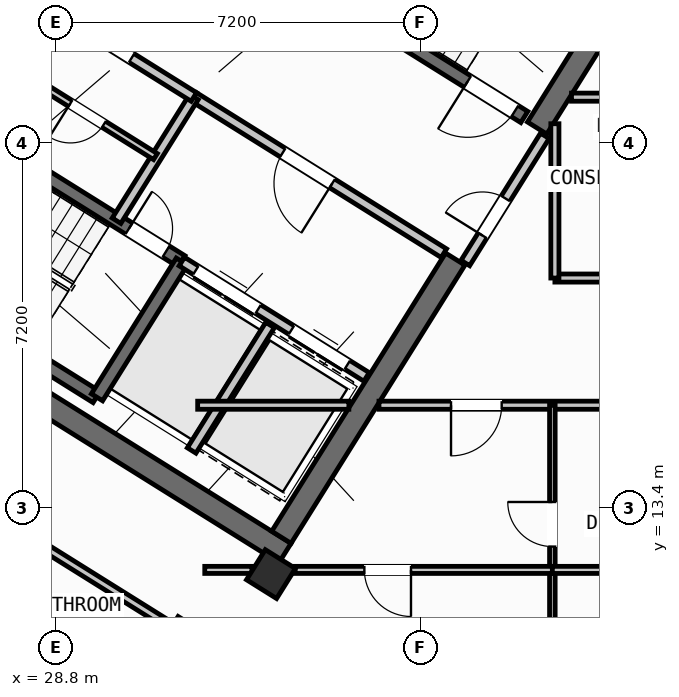
"""IFC4 building model, lengths in metres.
Left out: names, types, materials, properties, quantities, classifications, styles, units other than length and angle.
Written with IfcOpenShell. Run it as: python <this file> out.ifc"""

import sys

from ifc_helpers import new_model, si_unit, direction, frame, frame_2d, origin, origin_2d, place, context, subcontext, project, spatial, rectangle, hollow_rectangle, extrude, source, transform, mapped, element, fill, save


model = new_model("IFC4")
c1 = context("Model", 3, precision=1e-05, world=origin(), true_north=direction((0.0, 1.0)))
c2 = subcontext(c1, "Body", "Model", "MODEL_VIEW")
j1 = project(units=[si_unit("LENGTHUNIT", "METRE"), si_unit("PLANEANGLEUNIT", "RADIAN")], contexts=[c1])
p1 = place(None, origin())
s1 = spatial("IfcSite", under=j1, at=p1, CompositionType="ELEMENT")
p2 = place(p1, origin())
s2 = spatial("IfcBuilding", under=s1, at=p2, CompositionType="ELEMENT")
p3 = place(p2, frame((0.0, 0.0, 273.6)))
s3 = spatial("IfcBuildingStorey", under=s2, at=p3, CompositionType="ELEMENT", Elevation=273.6)
p4 = place(p3, frame((33.324, 12.503, 0.0), z_axis=(0.0, 0.0, 1.0), x_axis=(-0.848043529849, 0.529926571782, 0.0)))
e1 = element("IfcWall", 1, at=p4, inside=s3, PredefinedType="SHEAR", context=c2, shape_type="SweptSolid", body=[
    extrude(rectangle(XDim=13.04, YDim=0.45, at=frame_2d((6.52, 0.0))), origin(), (0.0, 0.0, 1.0), 3.35),
])
p5 = place(p3, frame((40.221, 23.965, 0.0), z_axis=(0.0, 0.0, 1.0), x_axis=(-0.529902075036, -0.848058836916, 0.0)))
e2 = element("IfcWall", 2, at=p5, inside=s3, PredefinedType="SHEAR", context=c2, shape_type="SweptSolid", body=[
    extrude(rectangle(XDim=3.625, YDim=0.45, at=frame_2d((1.812, 0.0))), origin(), (0.0, 0.0, 1.0), 3.35),
])
p6 = place(p3, frame((36.683, 18.304, 0.0), z_axis=(0.0, 0.0, 1.0), x_axis=(-0.529904039071, -0.848057609704, 0.0)))
e3 = element("IfcWall", 3, at=p6, inside=s3, PredefinedType="SHEAR", context=c2, shape_type="SweptSolid", body=[
    extrude(rectangle(XDim=6.475, YDim=0.45, at=frame_2d((3.238, 0.0))), origin(), (0.0, 0.0, 1.0), 3.35),
])
m1 = source(origin(), c2, "Body", "SweptSolid", [
    extrude(hollow_rectangle(XDim=0.7, YDim=0.7, WallThickness=0.028, at=origin_2d()), origin(), (0.0, 0.0, 1.0), 3.6),
])
p7 = place(p3, frame((33.046, 12.087, 0.0), z_axis=(0.0, 0.0, 1.0), x_axis=(-0.848048096156, 0.529919264233, 0.0)))
e4 = element("IfcColumn", 4, at=p7, inside=s3, PredefinedType="COLUMN", context=c2, shape_type="MappedRepresentation", body=[
    mapped(m1, transform((0.0, 0.0, 0.0), scale=1.0)),
])
p8 = place(p3, frame((29.268, 6.429, 0.0), z_axis=(0.0, 0.0, 1.0), x_axis=(-0.848049971435, 0.529916263149, 0.0)))
e5 = element("IfcWall", 5, at=p8, inside=s3, PredefinedType="STANDARD", context=c2, shape_type="SweptSolid", body=[
    extrude(rectangle(XDim=31.588, YDim=0.32, at=frame_2d((15.794, 0.0))), origin(), (0.0, 0.0, 1.0), 3.35),
])
p9 = place(p8, frame((16.362, 0.0, 0.0)))
e6 = element("IfcOpeningElement", 6, at=p9, cuts=e5, PredefinedType="OPENING", context=c2, shape_type="SweptSolid", body=[
    extrude(rectangle(XDim=1.2, YDim=2.15, at=frame_2d((0.6, 1.075))), frame((0.0, 0.17, 0.0), z_axis=(0.0, -1.0, 0.0), x_axis=(1.0, 0.0, 0.0)), (0.0, 0.0, 1.0), 0.34),
])
p10 = place(p8, frame((3.859, 0.0, 0.9)))
e7 = element("IfcOpeningElement", 7, at=p10, cuts=e5, PredefinedType="OPENING", context=c2, shape_type="SweptSolid", body=[
    extrude(rectangle(XDim=1.65, YDim=1.45, at=frame_2d((0.825, 0.725))), frame((0.0, 0.17, 0.0), z_axis=(0.0, -1.0, 0.0), x_axis=(1.0, 0.0, 0.0)), (0.0, 0.0, 1.0), 0.34),
])
p11 = place(p8, frame((10.519, 0.0, 0.9)))
e8 = element("IfcOpeningElement", 8, at=p11, cuts=e5, PredefinedType="OPENING", context=c2, shape_type="SweptSolid", body=[
    extrude(rectangle(XDim=1.65, YDim=1.45, at=frame_2d((0.825, 0.725))), frame((0.0, 0.17, 0.0), z_axis=(0.0, -1.0, 0.0), x_axis=(1.0, 0.0, 0.0)), (0.0, 0.0, 1.0), 0.34),
])
p12 = place(p8, frame((21.219, 0.0, 0.95)))
e9 = element("IfcOpeningElement", 9, at=p12, cuts=e5, PredefinedType="OPENING", context=c2, shape_type="SweptSolid", body=[
    extrude(rectangle(XDim=1.95, YDim=1.35, at=frame_2d((0.975, 0.675))), frame((0.0, 0.17, 0.0), z_axis=(0.0, -1.0, 0.0), x_axis=(1.0, 0.0, 0.0)), (0.0, 0.0, 1.0), 0.34),
])
p13 = place(p8, frame((26.406, 0.0, 1.0)))
e10 = element("IfcOpeningElement", 10, at=p13, cuts=e5, PredefinedType="OPENING", context=c2, shape_type="SweptSolid", body=[
    extrude(rectangle(XDim=0.9, YDim=1.25, at=frame_2d((0.45, 0.625))), frame((0.0, 0.17, 0.0), z_axis=(0.0, -1.0, 0.0), x_axis=(1.0, 0.0, 0.0)), (0.0, 0.0, 1.0), 0.34),
])
p14 = place(p8, frame((29.143, 0.0, 0.9)))
e11 = element("IfcOpeningElement", 11, at=p14, cuts=e5, PredefinedType="OPENING", context=c2, shape_type="SweptSolid", body=[
    extrude(rectangle(XDim=1.65, YDim=1.45, at=frame_2d((0.825, 0.725))), frame((0.0, 0.17, 0.0), z_axis=(0.0, -1.0, 0.0), x_axis=(1.0, 0.0, 0.0)), (0.0, 0.0, 1.0), 0.34),
])
p15 = place(p3, frame((29.605, 15.581, 0.0), z_axis=(0.0, 0.0, 1.0), x_axis=(-0.848036911448, 0.529937163087, 0.0)))
e12 = element("IfcWall", 12, at=p15, inside=s3, PredefinedType="SHEAR", context=c2, shape_type="SweptSolid", body=[
    extrude(rectangle(XDim=7.46, YDim=0.26, at=frame_2d((3.73, 0.0))), origin(), (0.0, 0.0, 1.0), 3.35),
])
p16 = place(p3, frame((31.28, 18.261, 0.0), z_axis=(0.0, 0.0, 1.0), x_axis=(-0.848051618787, 0.529913626805, 0.0)))
e13 = element("IfcWall", 13, at=p16, inside=s3, PredefinedType="SHEAR", context=c2, shape_type="SweptSolid", body=[
    extrude(rectangle(XDim=7.46, YDim=0.26, at=frame_2d((3.73, 0.0))), origin(), (0.0, 0.0, 1.0), 3.35),
])
p17 = place(p16, frame((0.36, 0.0, 0.0)))
e14 = element("IfcOpeningElement", 14, at=p17, cuts=e13, PredefinedType="OPENING", context=c2, shape_type="SweptSolid", body=[
    extrude(rectangle(XDim=0.86, YDim=2.05, at=frame_2d((0.43, 1.025))), frame((0.0, 0.14, 0.0), z_axis=(0.0, -1.0, 0.0), x_axis=(1.0, 0.0, 0.0)), (0.0, 0.0, 1.0), 0.28),
])
p18 = place(p3, frame((31.288, 18.256, 0.0), z_axis=(0.0, 0.0, 1.0), x_axis=(-0.529943379326, -0.848033026897, 0.0)))
e15 = element("IfcWall", 15, at=p18, inside=s3, PredefinedType="SHEAR", context=c2, shape_type="SweptSolid", body=[
    extrude(rectangle(XDim=3.16, YDim=0.26, at=frame_2d((1.58, 0.0))), origin(), (0.0, 0.0, 1.0), 3.35),
])
p19 = place(p3, frame((38.046, 21.108, 0.0), z_axis=(0.0, 0.0, 1.0), x_axis=(-0.848054434086, 0.529909121291, 0.0)))
e16 = element("IfcWall", 16, at=p19, inside=s3, PredefinedType="SHEAR", context=c2, shape_type="SweptSolid", body=[
    extrude(rectangle(XDim=7.33, YDim=0.26, at=frame_2d((3.665, 0.0))), origin(), (0.0, 0.0, 1.0), 3.35),
])
p20 = place(p19, frame((0.22, 0.0, 0.0)))
e17 = element("IfcOpeningElement", 17, at=p20, cuts=e16, PredefinedType="OPENING", context=c2, shape_type="SweptSolid", body=[
    extrude(rectangle(XDim=1.1, YDim=2.1, at=frame_2d((0.55, 1.05))), frame((0.0, 0.14, 0.0), z_axis=(0.0, -1.0, 0.0), x_axis=(1.0, 0.0, 0.0)), (0.0, 0.0, 1.0), 0.28),
])
p21 = place(p3, frame((34.933, 15.978, 0.0), z_axis=(0.0, 0.0, 1.0), x_axis=(-0.848055739377, 0.529907032327, 0.0)))
e18 = element("IfcWall", 18, at=p21, inside=s3, PredefinedType="STANDARD", context=c2, shape_type="SweptSolid", body=[
    extrude(rectangle(XDim=4.298, YDim=0.2, at=frame_2d((2.149, 0.0))), origin(), (0.0, 0.0, 1.0), 3.34),
])
p22 = place(p21, frame((0.448, 0.0, 0.0)))
e19 = element("IfcOpeningElement", 19, at=p22, cuts=e18, PredefinedType="OPENING", context=c2, shape_type="SweptSolid", body=[
    extrude(rectangle(XDim=1.3, YDim=2.2, at=frame_2d((0.65, 1.1))), frame((0.0, 0.11, 0.0), z_axis=(0.0, -1.0, 0.0), x_axis=(1.0, 0.0, 0.0)), (0.0, 0.0, 1.0), 0.22),
])
p23 = place(p21, frame((2.523, 0.0, 0.0)))
e20 = element("IfcOpeningElement", 20, at=p23, cuts=e18, PredefinedType="OPENING", context=c2, shape_type="SweptSolid", body=[
    extrude(rectangle(XDim=1.45, YDim=2.25, at=frame_2d((0.725, 1.125))), frame((0.0, 0.11, 0.0), z_axis=(0.0, -1.0, 0.0), x_axis=(1.0, 0.0, 0.0)), (0.0, 0.0, 1.0), 0.22),
])
p24 = place(p3, frame((36.459, 18.421, 0.0), z_axis=(0.0, 0.0, 1.0), x_axis=(-0.848059591691, 0.529900867089, 0.0)))
e21 = element("IfcWall", 21, at=p24, inside=s3, PredefinedType="STANDARD", context=c2, shape_type="SweptSolid", body=[
    extrude(rectangle(XDim=5.818, YDim=0.2, at=frame_2d((2.909, 0.0))), origin(), (0.0, 0.0, 1.0), 3.34),
])
p25 = place(p24, frame((2.598, 0.0, 0.0)))
e22 = element("IfcOpeningElement", 22, at=p25, cuts=e21, PredefinedType="OPENING", context=c2, shape_type="SweptSolid", body=[
    extrude(rectangle(XDim=1.15, YDim=2.1, at=frame_2d((0.575, 1.05))), frame((0.0, 0.11, 0.0), z_axis=(0.0, -1.0, 0.0), x_axis=(1.0, 0.0, 0.0)), (0.0, 0.0, 1.0), 0.22),
])
p26 = place(p3, frame((33.029, 17.003, 0.0), z_axis=(0.0, 0.0, 1.0), x_axis=(-0.529916267533, -0.848049968695, 0.0)))
e23 = element("IfcWall", 23, at=p26, inside=s3, PredefinedType="STANDARD", context=c2, shape_type="SweptSolid", body=[
    extrude(rectangle(XDim=2.92, YDim=0.2, at=frame_2d((1.46, 0.0))), origin(), (0.0, 0.0, 1.0), 3.34),
])
for number, where, z_axis, x_axis in (
    (24, (31.525, 21.504, 0.0), (0.0, 0.0, 1.0), (-0.53, -0.848, 0.0)),
    (25, (28.71, 23.263, 0.0), (0.0, 0.0, 1.0), (-0.53, -0.848, 0.0)),
):
    element("IfcWall", number, at=place(p3, frame(where, z_axis=z_axis, x_axis=x_axis)), inside=s3, PredefinedType="STANDARD", context=c2, shape_type="SweptSolid", body=[
        extrude(rectangle(XDim=2.88, YDim=0.2, at=frame_2d((1.44, 0.0))), origin(), (0.0, 0.0, 1.0), 3.34),
    ])
p27 = place(p3, frame((31.525, 21.504, 0.0), z_axis=(0.0, 0.0, 1.0), x_axis=(-0.848042066329, 0.529928913853, 0.0)))
e26 = element("IfcWall", 26, at=p27, inside=s3, PredefinedType="STANDARD", context=c2, shape_type="SweptSolid", body=[
    extrude(rectangle(XDim=6.268, YDim=0.2, at=frame_2d((3.134, 0.0))), origin(), (0.0, 0.0, 1.0), 3.34),
])
p28 = place(p27, frame((4.4, 0.0, 0.0)))
e27 = element("IfcOpeningElement", 27, at=p28, cuts=e26, PredefinedType="OPENING", context=c2, shape_type="SweptSolid", body=[
    extrude(rectangle(XDim=0.86, YDim=2.05, at=frame_2d((0.43, 1.025))), frame((0.0, 0.11, 0.0), z_axis=(0.0, -1.0, 0.0), x_axis=(1.0, 0.0, 0.0)), (0.0, 0.0, 1.0), 0.22),
])
p29 = place(p27, frame((1.45, 0.0, 0.0)))
e28 = element("IfcOpeningElement", 28, at=p29, cuts=e26, PredefinedType="OPENING", context=c2, shape_type="SweptSolid", body=[
    extrude(rectangle(XDim=0.86, YDim=2.05, at=frame_2d((0.43, 1.025))), frame((0.0, 0.11, 0.0), z_axis=(0.0, -1.0, 0.0), x_axis=(1.0, 0.0, 0.0)), (0.0, 0.0, 1.0), 0.22),
])
p30 = place(p3, frame((30.766, 20.327, 0.0), z_axis=(0.0, 0.0, 1.0), x_axis=(-0.848052663127, 0.529911955482, 0.0)))
e29 = element("IfcWall", 29, at=p30, inside=s3, PredefinedType="PLUMBINGWALL", context=c2, shape_type="SweptSolid", body=[
    extrude(rectangle(XDim=3.28, YDim=0.14, at=frame_2d((1.64, 0.0))), origin(), (0.0, 0.0, 1.0), 3.34),
])
p31 = place(p30, frame((1.2, 0.0, 0.0)))
e30 = element("IfcOpeningElement", 30, at=p31, cuts=e29, PredefinedType="OPENING", context=c2, shape_type="SweptSolid", body=[
    extrude(rectangle(XDim=0.78, YDim=2.05, at=frame_2d((0.39, 1.025))), frame((0.0, 0.08, 0.0), z_axis=(0.0, -1.0, 0.0), x_axis=(1.0, 0.0, 0.0)), (0.0, 0.0, 1.0), 0.16),
])
p32 = place(p3, frame((32.164, 10.374, 0.0), z_axis=(0.0, 0.0, 1.0), x_axis=(-0.848044107957, 0.529925646633, 0.0)))
e31 = element("IfcWall", 31, at=p32, inside=s3, PredefinedType="PARTITIONING", context=c2, shape_type="SweptSolid", body=[
    extrude(rectangle(XDim=15.57, YDim=0.16, at=frame_2d((7.785, 0.0))), origin(), (0.0, 0.0, 1.0), 3.34),
])
p33 = place(p32, frame((10.83, 0.0, 0.0)))
e32 = element("IfcOpeningElement", 32, at=p33, cuts=e31, PredefinedType="OPENING", context=c2, shape_type="SweptSolid", body=[
    extrude(rectangle(XDim=1.0, YDim=2.1, at=frame_2d((0.5, 1.05))), frame((0.0, 0.09, 0.0), z_axis=(0.0, -1.0, 0.0), x_axis=(1.0, 0.0, 0.0)), (0.0, 0.0, 1.0), 0.18),
])
p34 = place(p3, frame((31.282, 11.208, 0.0), z_axis=(0.0, 0.0, 1.0), x_axis=(-0.529938869374, -0.84803584519, 0.0)))
e33 = element("IfcWall", 33, at=p34, inside=s3, PredefinedType="PARTITIONING", context=c2, shape_type="SweptSolid", body=[
    extrude(rectangle(XDim=5.48, YDim=0.16, at=frame_2d((2.74, 0.0))), origin(), (0.0, 0.0, 1.0), 3.34),
])
p35 = place(p3, frame((29.72, 8.859, 0.0), z_axis=(0.0, 0.0, 1.0), x_axis=(-0.848049134363, 0.529917602752, 0.0)))
e34 = element("IfcWall", 34, at=p35, inside=s3, PredefinedType="PLUMBINGWALL", context=c2, shape_type="SweptSolid", body=[
    extrude(rectangle(XDim=14.3, YDim=0.14, at=frame_2d((7.15, 0.0))), origin(), (0.0, 0.0, 1.0), 3.34),
])
p36 = place(p35, frame((9.57, 0.0, 0.0)))
e35 = element("IfcOpeningElement", 35, at=p36, cuts=e34, PredefinedType="OPENING", context=c2, shape_type="SweptSolid", body=[
    extrude(rectangle(XDim=0.92, YDim=2.08, at=frame_2d((0.46, 1.04))), frame((0.0, 0.08, 0.0), z_axis=(0.0, -1.0, 0.0), x_axis=(1.0, 0.0, 0.0)), (0.0, 0.0, 1.0), 0.16),
])
p37 = place(p3, frame((38.451, 20.737, 0.0), z_axis=(0.0, 0.0, 1.0), x_axis=(-0.529924799939, -0.848044637038, 0.0)))
e36 = element("IfcWall", 36, at=p37, inside=s3, PredefinedType="STANDARD", context=c2, shape_type="SweptSolid", body=[
    extrude(rectangle(XDim=2.96, YDim=0.2, at=frame_2d((1.48, 0.0))), origin(), (0.0, 0.0, 1.0), 3.34),
])
p38 = place(p37, frame((1.46, 0.0, 0.0)))
e37 = element("IfcOpeningElement", 37, at=p38, cuts=e36, PredefinedType="OPENING", context=c2, shape_type="SweptSolid", body=[
    extrude(rectangle(XDim=0.86, YDim=2.05, at=frame_2d((0.43, 1.025))), frame((0.0, 0.11, 0.0), z_axis=(0.0, -1.0, 0.0), x_axis=(1.0, 0.0, 0.0)), (0.0, 0.0, 1.0), 0.22),
])
p39 = place(p3, frame((31.6, 15.42, 0.0), z_axis=(0.0, 0.0, 1.0), x_axis=(1.0, 0.0, 0.0)))
e38 = element("IfcWall", 38, at=p39, inside=s3, PredefinedType="PARTITIONING", context=c2, shape_type="SweptSolid", body=[
    extrude(rectangle(XDim=2.984, YDim=0.16, at=frame_2d((1.492, 0.0))), origin(), (0.0, 0.0, 1.0), 3.34),
])
p40 = place(p3, frame((35.178, 15.42, 0.0), z_axis=(0.0, 0.0, 1.0), x_axis=(1.0, 0.0, 0.0)))
e39 = element("IfcWall", 39, at=p40, inside=s3, PredefinedType="PARTITIONING", context=c2, shape_type="SweptSolid", body=[
    extrude(rectangle(XDim=9.021, YDim=0.16, at=frame_2d((4.511, 0.0))), origin(), (0.0, 0.0, 1.0), 3.34),
])
p41 = place(p40, frame((1.422, 0.0, 0.0)))
e40 = element("IfcOpeningElement", 40, at=p41, cuts=e39, PredefinedType="OPENING", context=c2, shape_type="SweptSolid", body=[
    extrude(rectangle(XDim=1.0, YDim=2.1, at=frame_2d((0.5, 1.05))), frame((0.0, 0.09, 0.0), z_axis=(0.0, -1.0, 0.0), x_axis=(1.0, 0.0, 0.0)), (0.0, 0.0, 1.0), 0.18),
])
p42 = place(p3, frame((38.65, 17.93, 0.0), z_axis=(0.0, 0.0, 1.0), x_axis=(1.0, 0.0, 0.0)))
e41 = element("IfcWall", 41, at=p42, inside=s3, PredefinedType="PARTITIONING", context=c2, shape_type="SweptSolid", body=[
    extrude(rectangle(XDim=4.15, YDim=0.16, at=frame_2d((2.075, 0.0))), origin(), (0.0, 0.0, 1.0), 3.34),
])
p43 = place(p42, frame((1.575, 0.0, 0.0)))
e42 = element("IfcOpeningElement", 42, at=p43, cuts=e41, PredefinedType="OPENING", context=c2, shape_type="SweptSolid", body=[
    extrude(rectangle(XDim=1.0, YDim=2.1, at=frame_2d((0.5, 1.05))), frame((0.0, 0.09, 0.0), z_axis=(0.0, -1.0, 0.0), x_axis=(1.0, 0.0, 0.0)), (0.0, 0.0, 1.0), 0.18),
])
p44 = place(p3, frame((38.65, 17.93, 0.0), z_axis=(0.0, 0.0, 1.0), x_axis=(0.0, 1.0, 0.0)))
e43 = element("IfcWall", 43, at=p44, inside=s3, PredefinedType="PARTITIONING", context=c2, shape_type="SweptSolid", body=[
    extrude(rectangle(XDim=3.046, YDim=0.16, at=frame_2d((1.523, 0.0))), origin(), (0.0, 0.0, 1.0), 3.34),
])
p45 = place(p3, frame((38.978, 21.5, 0.0), z_axis=(0.0, 0.0, 1.0), x_axis=(1.0, 0.0, 0.0)))
e44 = element("IfcWall", 44, at=p45, inside=s3, PredefinedType="PARTITIONING", context=c2, shape_type="SweptSolid", body=[
    extrude(rectangle(XDim=3.823, YDim=0.16, at=frame_2d((1.911, 0.0))), origin(), (0.0, 0.0, 1.0), 3.34),
])
p46 = place(p3, frame((38.6, 1.96, 0.0), z_axis=(0.0, 0.0, 1.0), x_axis=(0.0, 1.0, 0.0)))
e45 = element("IfcWall", 45, at=p46, inside=s3, PredefinedType="PARTITIONING", context=c2, shape_type="SweptSolid", body=[
    extrude(rectangle(XDim=13.46, YDim=0.11, at=frame_2d((6.73, 0.0))), origin(), (0.0, 0.0, 1.0), 3.34),
])
p47 = place(p46, frame((5.2, 0.0, 0.0)))
e46 = element("IfcOpeningElement", 46, at=p47, cuts=e45, PredefinedType="OPENING", context=c2, shape_type="SweptSolid", body=[
    extrude(rectangle(XDim=0.92, YDim=2.08, at=frame_2d((0.46, 1.04))), frame((0.0, 0.065, 0.0), z_axis=(0.0, -1.0, 0.0), x_axis=(1.0, 0.0, 0.0)), (0.0, 0.0, 1.0), 0.13),
])
p48 = place(p46, frame((10.67, 0.0, 0.0)))
e47 = element("IfcOpeningElement", 47, at=p48, cuts=e45, PredefinedType="OPENING", context=c2, shape_type="SweptSolid", body=[
    extrude(rectangle(XDim=0.88, YDim=2.08, at=frame_2d((0.44, 1.04))), frame((0.0, 0.065, 0.0), z_axis=(0.0, -1.0, 0.0), x_axis=(1.0, 0.0, 0.0)), (0.0, 0.0, 1.0), 0.13),
])
p49 = place(p3, frame((31.74, 12.17, 0.0), z_axis=(0.0, 0.0, 1.0), x_axis=(1.0, 0.0, 0.0)))
e48 = element("IfcWall", 48, at=p49, inside=s3, PredefinedType="PLUMBINGWALL", context=c2, shape_type="SweptSolid", body=[
    extrude(rectangle(XDim=0.931, YDim=0.14, at=frame_2d((0.466, 0.0))), origin(), (0.0, 0.0, 1.0), 3.34),
])
p50 = place(p3, frame((33.525, 12.17, 0.0), z_axis=(0.0, 0.0, 1.0), x_axis=(1.0, 0.0, 0.0)))
e49 = element("IfcWall", 49, at=p50, inside=s3, PredefinedType="PLUMBINGWALL", context=c2, shape_type="SweptSolid", body=[
    extrude(rectangle(XDim=5.075, YDim=0.14, at=frame_2d((2.538, 0.0))), origin(), (0.0, 0.0, 1.0), 3.34),
])
p51 = place(p50, frame((1.365, 0.0, 0.0)))
e50 = element("IfcOpeningElement", 50, at=p51, cuts=e49, PredefinedType="OPENING", context=c2, shape_type="SweptSolid", body=[
    extrude(rectangle(XDim=0.92, YDim=2.08, at=frame_2d((0.46, 1.04))), frame((0.0, 0.08, 0.0), z_axis=(0.0, -1.0, 0.0), x_axis=(1.0, 0.0, 0.0)), (0.0, 0.0, 1.0), 0.16),
])
p52 = place(p3, frame((38.6, 12.17, 0.0), z_axis=(0.0, 0.0, 1.0), x_axis=(1.0, 0.0, 0.0)))
e51 = element("IfcWall", 51, at=p52, inside=s3, PredefinedType="PLUMBINGWALL", context=c2, shape_type="SweptSolid", body=[
    extrude(rectangle(XDim=5.46, YDim=0.14, at=frame_2d((2.73, 0.0))), origin(), (0.0, 0.0, 1.0), 3.34),
])
m2 = source(origin(), c2, "Body", "SweptSolid", [
    extrude(rectangle(XDim=0.86, YDim=2.05, at=frame_2d((0.43, 1.025))), frame((0.0, 0.025, 0.0), z_axis=(0.0, -1.0, 0.0), x_axis=(1.0, 0.0, 0.0)), (0.0, 0.0, 1.0), 0.05),
])
p53 = place(p17, frame((0.86, 0.0, 0.0), z_axis=(0.0, 0.0, 1.0), x_axis=(-1.0, 0.0, 0.0)))
e52 = element("IfcDoor", 52, at=p53, inside=s3, OperationType="SINGLE_SWING_LEFT", PredefinedType="DOOR", context=c2, shape_type="MappedRepresentation", body=[
    mapped(m2, transform((0.0, 0.0, 0.0), scale=1.0)),
])
fill(e14, e52)
m3 = source(origin(), c2, "Body", "SweptSolid", [
    extrude(rectangle(XDim=1.1, YDim=2.1, at=frame_2d((0.55, 1.05))), frame((0.0, 0.025, 0.0), z_axis=(0.0, -1.0, 0.0), x_axis=(1.0, 0.0, 0.0)), (0.0, 0.0, 1.0), 0.05),
])
p54 = place(p20, origin())
e53 = element("IfcDoor", 53, at=p54, inside=s3, OperationType="SINGLE_SWING_RIGHT", PredefinedType="DOOR", context=c2, shape_type="MappedRepresentation", body=[
    mapped(m3, transform((0.0, 0.0, 0.0), scale=1.0)),
])
fill(e17, e53)
m4 = source(origin(), c2, "Body", "SweptSolid", [
    extrude(rectangle(XDim=1.15, YDim=2.1, at=frame_2d((0.575, 1.05))), frame((0.0, 0.025, 0.0), z_axis=(0.0, -1.0, 0.0), x_axis=(1.0, 0.0, 0.0)), (0.0, 0.0, 1.0), 0.05),
])
p55 = place(p25, origin())
e54 = element("IfcDoor", 54, at=p55, inside=s3, OperationType="SINGLE_SWING_LEFT", PredefinedType="DOOR", context=c2, shape_type="MappedRepresentation", body=[
    mapped(m4, transform((0.0, 0.0, 0.0), scale=1.0)),
])
fill(e22, e54)
m5 = source(origin(), c2, "Body", "SweptSolid", [
    extrude(rectangle(XDim=1.3, YDim=2.2, at=frame_2d((0.65, 1.1))), frame((0.0, 0.025, 0.0), z_axis=(0.0, -1.0, 0.0), x_axis=(1.0, 0.0, 0.0)), (0.0, 0.0, 1.0), 0.05),
])
p56 = place(p22, origin())
e55 = element("IfcDoor", 55, at=p56, inside=s3, OperationType="DOUBLE_DOOR_SLIDING", PredefinedType="DOOR", context=c2, shape_type="MappedRepresentation", body=[
    mapped(m5, transform((0.0, 0.0, 0.0), scale=1.0)),
])
fill(e19, e55)
m6 = source(origin(), c2, "Body", "SweptSolid", [
    extrude(rectangle(XDim=1.45, YDim=2.25, at=frame_2d((0.725, 1.125))), frame((0.0, 0.025, 0.0), z_axis=(0.0, -1.0, 0.0), x_axis=(1.0, 0.0, 0.0)), (0.0, 0.0, 1.0), 0.05),
])
p57 = place(p23, origin())
e56 = element("IfcDoor", 56, at=p57, inside=s3, OperationType="DOUBLE_DOOR_SLIDING", PredefinedType="DOOR", context=c2, shape_type="MappedRepresentation", body=[
    mapped(m6, transform((0.0, 0.0, 0.0), scale=1.0)),
])
fill(e20, e56)
p58 = place(p29, frame((0.86, 0.0, 0.0), z_axis=(0.0, 0.0, 1.0), x_axis=(-1.0, 0.0, 0.0)))
e57 = element("IfcDoor", 57, at=p58, inside=s3, OperationType="SINGLE_SWING_LEFT", PredefinedType="DOOR", context=c2, shape_type="MappedRepresentation", body=[
    mapped(m2, transform((0.0, 0.0, 0.0), scale=1.0)),
])
fill(e28, e57)
m7 = source(origin(), c2, "Body", "SweptSolid", [
    extrude(rectangle(XDim=0.78, YDim=2.05, at=frame_2d((0.39, 1.025))), frame((0.0, 0.025, 0.0), z_axis=(0.0, -1.0, 0.0), x_axis=(1.0, 0.0, 0.0)), (0.0, 0.0, 1.0), 0.05),
])
p59 = place(p31, origin())
e58 = element("IfcDoor", 58, at=p59, inside=s3, OperationType="SINGLE_SWING_RIGHT", PredefinedType="DOOR", context=c2, shape_type="MappedRepresentation", body=[
    mapped(m7, transform((0.0, 0.0, 0.0), scale=1.0)),
])
fill(e30, e58)
p60 = place(p38, frame((0.86, 0.0, 0.0), z_axis=(0.0, 0.0, 1.0), x_axis=(-1.0, 0.0, 0.0)))
e59 = element("IfcDoor", 59, at=p60, inside=s3, OperationType="SINGLE_SWING_LEFT", PredefinedType="DOOR", context=c2, shape_type="MappedRepresentation", body=[
    mapped(m2, transform((0.0, 0.0, 0.0), scale=1.0)),
])
fill(e37, e59)
m8 = source(origin(), c2, "Body", "SweptSolid", [
    extrude(rectangle(XDim=1.0, YDim=2.1, at=frame_2d((0.5, 1.05))), frame((0.0, 0.025, 0.0), z_axis=(0.0, -1.0, 0.0), x_axis=(1.0, 0.0, 0.0)), (0.0, 0.0, 1.0), 0.05),
])
p61 = place(p41, frame((1.0, 0.0, 0.0), z_axis=(0.0, 0.0, 1.0), x_axis=(-1.0, 0.0, 0.0)))
e60 = element("IfcDoor", 60, at=p61, inside=s3, OperationType="SINGLE_SWING_RIGHT", PredefinedType="DOOR", context=c2, shape_type="MappedRepresentation", body=[
    mapped(m8, transform((0.0, 0.0, 0.0), scale=1.0)),
])
fill(e40, e60)
m9 = source(origin(), c2, "Body", "SweptSolid", [
    extrude(rectangle(XDim=0.92, YDim=2.08, at=frame_2d((0.46, 1.04))), frame((0.0, 0.025, 0.0), z_axis=(0.0, -1.0, 0.0), x_axis=(1.0, 0.0, 0.0)), (0.0, 0.0, 1.0), 0.05),
])
p62 = place(p51, frame((0.92, 0.0, 0.0), z_axis=(0.0, 0.0, 1.0), x_axis=(-1.0, 0.0, 0.0)))
e61 = element("IfcDoor", 61, at=p62, inside=s3, OperationType="SINGLE_SWING_LEFT", PredefinedType="DOOR", context=c2, shape_type="MappedRepresentation", body=[
    mapped(m9, transform((0.0, 0.0, 0.0), scale=1.0)),
])
fill(e50, e61)
m10 = source(origin(), c2, "Body", "SweptSolid", [
    extrude(rectangle(XDim=0.88, YDim=2.08, at=frame_2d((0.44, 1.04))), frame((0.0, 0.025, 0.0), z_axis=(0.0, -1.0, 0.0), x_axis=(1.0, 0.0, 0.0)), (0.0, 0.0, 1.0), 0.05),
])
p63 = place(p48, origin())
e62 = element("IfcDoor", 62, at=p63, inside=s3, OperationType="SINGLE_SWING_RIGHT", PredefinedType="DOOR", context=c2, shape_type="MappedRepresentation", body=[
    mapped(m10, transform((0.0, 0.0, 0.0), scale=1.0)),
])
fill(e47, e62)
save(model, sys.argv[1])
